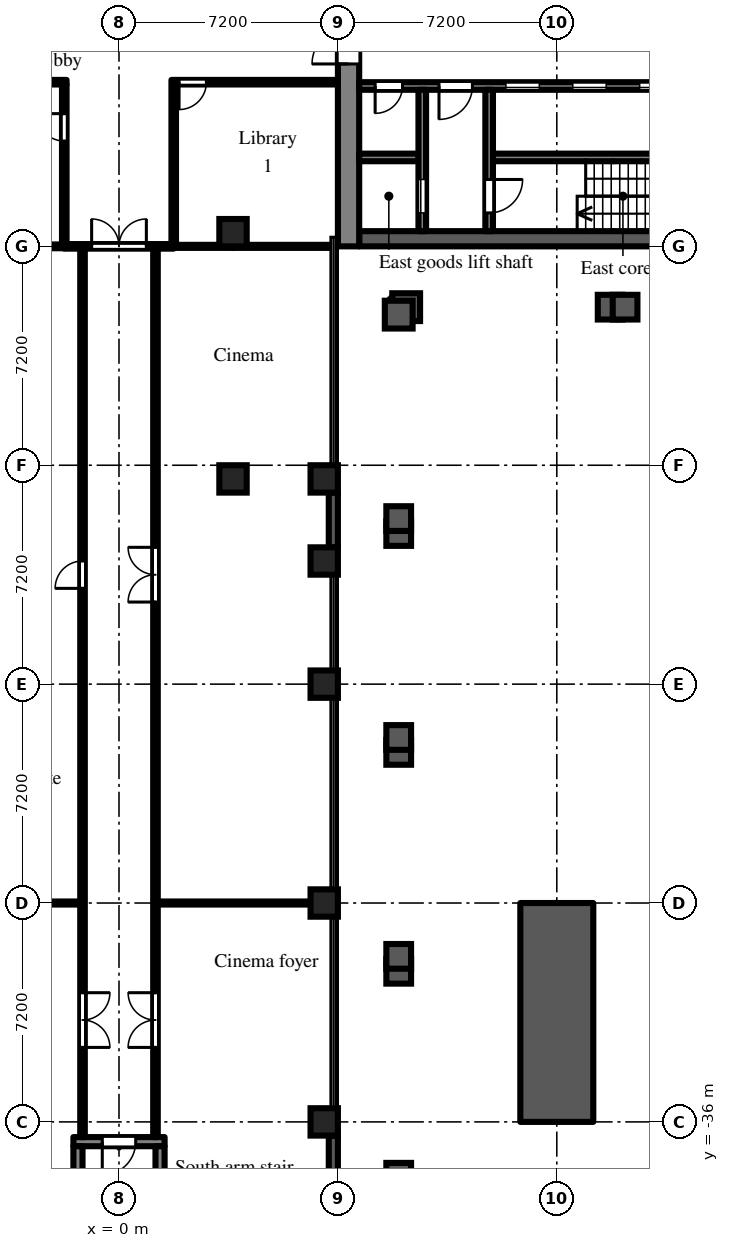
"""IFC4 building model, lengths in metres.
Left out: names, types, materials, properties, quantities, classifications, styles, units other than length and angle.
Written with IfcOpenShell. Run it as: python <this file> out.ifc"""

import sys

from ifc_helpers import new_model, si_unit, direction, frame, frame_2d, origin, origin_2d, place, context, subcontext, project, spatial, rectangle, extrude, element, fill, save


model = new_model("IFC4")
c1 = context("Model", 3, precision=1e-05, world=origin(), true_north=direction((0.0, 1.0)))
c2 = subcontext(c1, "Body", "Model", "MODEL_VIEW")
j1 = project(units=[si_unit("LENGTHUNIT", "METRE"), si_unit("PLANEANGLEUNIT", "RADIAN")], contexts=[c1])
p1 = place(None, origin())
s1 = spatial("IfcSite", under=j1, at=p1, CompositionType="ELEMENT")
p2 = place(p1, origin())
s2 = spatial("IfcBuilding", under=s1, at=p2, CompositionType="ELEMENT")
p3 = place(p2, frame((0.0, 0.0, 7.2)))
s3 = spatial("IfcBuildingStorey", under=s2, at=p3, CompositionType="ELEMENT", Elevation=7.2)
for number, where, z_axis, x_axis in (
    (1, (3.75, -14.85, 0.0), (0.0, 0.0, 1.0), (1.0, 0.0, 0.0)),
    (2, (3.75, -6.75, 0.0), (0.0, 0.0, 1.0), (1.0, 0.0, 0.0)),
    (3, (6.75, -36.0, 0.0), (0.0, 0.0, 1.0), (1.0, 0.0, 0.0)),
    (4, (6.75, -28.8, 0.0), (0.0, 0.0, 1.0), (1.0, 0.0, 0.0)),
    (5, (6.75, -21.6, 0.0), (0.0, 0.0, 1.0), (1.0, 0.0, 0.0)),
    (6, (6.75, -17.55, 0.0), (0.0, 0.0, 1.0), (1.0, 0.0, 0.0)),
    (7, (6.75, -14.85, 0.0), (0.0, 0.0, 1.0), (1.0, 0.0, 0.0)),
):
    element("IfcColumn", number, at=place(p3, frame(where, z_axis=z_axis, x_axis=x_axis)), inside=s3, PredefinedType="COLUMN", context=c2, shape_type="SweptSolid", body=[
        extrude(rectangle(XDim=0.9, YDim=0.9, at=origin_2d()), origin(), (0.0, 0.0, 1.0), 4.5),
    ])
p4 = place(p3, frame((14.4, -36.0, 0.0), z_axis=(0.0, 0.0, 1.0), x_axis=(0.0, 1.0, 0.0)))
e8 = element("IfcWall", 8, at=p4, inside=s3, PredefinedType="SOLIDWALL", context=c2, shape_type="SweptSolid", body=[
    extrude(rectangle(XDim=7.2, YDim=2.4, at=frame_2d((3.6, 0.0))), origin(), (0.0, 0.0, 1.0), 0.8),
])
p5 = place(p3, frame((7.05, -38.7, 0.0), z_axis=(0.0, 0.0, 1.0), x_axis=(0.0, 1.0, 0.0)))
e9 = element("IfcWall", 9, at=p5, inside=s3, PredefinedType="SOLIDWALL", context=c2, shape_type="SweptSolid", body=[
    extrude(rectangle(XDim=2.25, YDim=0.3, at=frame_2d((1.125, 0.0))), origin(), (0.0, 0.0, 1.0), 3.6),
])
p6 = place(p3, frame((7.05, -17.1, 0.0), z_axis=(0.0, 0.0, 1.0), x_axis=(0.0, 1.0, 0.0)))
e10 = element("IfcWall", 10, at=p6, inside=s3, PredefinedType="SOLIDWALL", context=c2, shape_type="SweptSolid", body=[
    extrude(rectangle(XDim=1.8, YDim=0.3, at=frame_2d((0.9, 0.0))), origin(), (0.0, 0.0, 1.0), 3.6),
])
p7 = place(p3, frame((7.55, -7.2, 0.0), z_axis=(0.0, 0.0, 1.0), x_axis=(0.0, 1.0, 0.0)))
e11 = element("IfcWall", 11, at=p7, inside=s3, PredefinedType="SHEAR", context=c2, shape_type="SweptSolid", body=[
    extrude(rectangle(XDim=14.4, YDim=0.7, at=frame_2d((7.2, 0.0))), origin(), (0.0, 0.0, 1.0), 4.075),
])
p8 = place(p7, frame((6.0, 0.0, 0.0)))
e12 = element("IfcOpeningElement", 12, at=p8, cuts=e11, PredefinedType="OPENING", context=c2, shape_type="SweptSolid", body=[
    extrude(rectangle(XDim=2.4, YDim=2.2, at=frame_2d((1.2, 1.1))), frame((0.0, 0.36, 0.0), z_axis=(0.0, -1.0, 0.0), x_axis=(1.0, 0.0, 0.0)), (0.0, 0.0, 1.0), 0.72),
])
p9 = place(p3, frame((7.9, -6.95, 0.0), z_axis=(0.0, 0.0, 1.0), x_axis=(1.0, 0.0, 0.0)))
e13 = element("IfcWall", 13, at=p9, inside=s3, PredefinedType="SHEAR", context=c2, shape_type="SweptSolid", body=[
    extrude(rectangle(XDim=12.95, YDim=0.5, at=frame_2d((6.475, 0.0))), origin(), (0.0, 0.0, 1.0), 4.075),
])
p10 = place(p3, frame((7.9, -1.925, 0.0), z_axis=(0.0, 0.0, 1.0), x_axis=(1.0, 0.0, 0.0)))
e14 = element("IfcWall", 14, at=p10, inside=s3, PredefinedType="SHEAR", context=c2, shape_type="SweptSolid", body=[
    extrude(rectangle(XDim=12.95, YDim=0.25, at=frame_2d((6.475, 0.0))), origin(), (0.0, 0.0, 1.0), 4.075),
])
p11 = place(p10, frame((4.825, 0.0, 0.0)))
e15 = element("IfcOpeningElement", 15, at=p11, cuts=e14, PredefinedType="OPENING", context=c2, shape_type="SweptSolid", body=[
    extrude(rectangle(XDim=1.1, YDim=2.1, at=frame_2d((0.55, 1.05))), frame((0.0, 0.135, 0.0), z_axis=(0.0, -1.0, 0.0), x_axis=(1.0, 0.0, 0.0)), (0.0, 0.0, 1.0), 0.27),
])
p12 = place(p10, frame((7.025, 0.0, 0.0)))
e16 = element("IfcOpeningElement", 16, at=p12, cuts=e14, PredefinedType="OPENING", context=c2, shape_type="SweptSolid", body=[
    extrude(rectangle(XDim=1.1, YDim=2.1, at=frame_2d((0.55, 1.05))), frame((0.0, 0.135, 0.0), z_axis=(0.0, -1.0, 0.0), x_axis=(1.0, 0.0, 0.0)), (0.0, 0.0, 1.0), 0.27),
])
p13 = place(p10, frame((9.225, 0.0, 0.0)))
e17 = element("IfcOpeningElement", 17, at=p13, cuts=e14, PredefinedType="OPENING", context=c2, shape_type="SweptSolid", body=[
    extrude(rectangle(XDim=1.1, YDim=2.1, at=frame_2d((0.55, 1.05))), frame((0.0, 0.135, 0.0), z_axis=(0.0, -1.0, 0.0), x_axis=(1.0, 0.0, 0.0)), (0.0, 0.0, 1.0), 0.27),
])
p14 = place(p10, frame((0.525, 0.0, 0.0)))
e18 = element("IfcOpeningElement", 18, at=p14, cuts=e14, PredefinedType="OPENING", context=c2, shape_type="SweptSolid", body=[
    extrude(rectangle(XDim=0.9, YDim=2.1, at=frame_2d((0.45, 1.05))), frame((0.0, 0.135, 0.0), z_axis=(0.0, -1.0, 0.0), x_axis=(1.0, 0.0, 0.0)), (0.0, 0.0, 1.0), 0.27),
])
p15 = place(p10, frame((2.625, 0.0, 0.0)))
e19 = element("IfcOpeningElement", 19, at=p15, cuts=e14, PredefinedType="OPENING", context=c2, shape_type="SweptSolid", body=[
    extrude(rectangle(XDim=1.1, YDim=2.1, at=frame_2d((0.55, 1.05))), frame((0.0, 0.135, 0.0), z_axis=(0.0, -1.0, 0.0), x_axis=(1.0, 0.0, 0.0)), (0.0, 0.0, 1.0), 0.27),
])
p16 = place(p3, frame((7.9, -4.275, 0.0), z_axis=(0.0, 0.0, 1.0), x_axis=(1.0, 0.0, 0.0)))
e20 = element("IfcWall", 20, at=p16, inside=s3, PredefinedType="SHEAR", context=c2, shape_type="SweptSolid", body=[
    extrude(rectangle(XDim=1.95, YDim=0.25, at=frame_2d((0.975, 0.0))), origin(), (0.0, 0.0, 1.0), 4.075),
])
p17 = place(p3, frame((12.3, -4.275, 0.0), z_axis=(0.0, 0.0, 1.0), x_axis=(1.0, 0.0, 0.0)))
e21 = element("IfcWall", 21, at=p17, inside=s3, PredefinedType="SHEAR", context=c2, shape_type="SweptSolid", body=[
    extrude(rectangle(XDim=8.55, YDim=0.25, at=frame_2d((4.275, 0.0))), origin(), (0.0, 0.0, 1.0), 4.075),
])
p18 = place(p3, frame((9.975, -2.05, 0.0), z_axis=(0.0, 0.0, 1.0), x_axis=(0.0, -1.0, 0.0)))
e22 = element("IfcWall", 22, at=p18, inside=s3, PredefinedType="SHEAR", context=c2, shape_type="SweptSolid", body=[
    extrude(rectangle(XDim=4.65, YDim=0.25, at=frame_2d((2.325, 0.0))), origin(), (0.0, 0.0, 1.0), 4.075),
])
p19 = place(p18, frame((2.95, 0.0, 0.0)))
e23 = element("IfcOpeningElement", 23, at=p19, cuts=e22, PredefinedType="OPENING", context=c2, shape_type="SweptSolid", body=[
    extrude(rectangle(XDim=1.1, YDim=2.1, at=frame_2d((0.55, 1.05))), frame((0.0, 0.135, 0.0), z_axis=(0.0, -1.0, 0.0), x_axis=(1.0, 0.0, 0.0)), (0.0, 0.0, 1.0), 0.27),
])
p20 = place(p3, frame((12.175, -2.05, 0.0), z_axis=(0.0, 0.0, 1.0), x_axis=(0.0, -1.0, 0.0)))
e24 = element("IfcWall", 24, at=p20, inside=s3, PredefinedType="SHEAR", context=c2, shape_type="SweptSolid", body=[
    extrude(rectangle(XDim=4.65, YDim=0.25, at=frame_2d((2.325, 0.0))), origin(), (0.0, 0.0, 1.0), 4.075),
])
p21 = place(p20, frame((2.95, 0.0, 0.0)))
e25 = element("IfcOpeningElement", 25, at=p21, cuts=e24, PredefinedType="OPENING", context=c2, shape_type="SweptSolid", body=[
    extrude(rectangle(XDim=1.1, YDim=2.1, at=frame_2d((0.55, 1.05))), frame((0.0, 0.135, 0.0), z_axis=(0.0, -1.0, 0.0), x_axis=(1.0, 0.0, 0.0)), (0.0, 0.0, 1.0), 0.27),
])
p22 = place(p3, frame((-1.5, -36.65, 0.0), z_axis=(0.0, 0.0, 1.0), x_axis=(1.0, 0.0, 0.0)))
e26 = element("IfcWall", 26, at=p22, inside=s3, PredefinedType="SHEAR", context=c2, shape_type="SweptSolid", body=[
    extrude(rectangle(XDim=3.0, YDim=0.3, at=frame_2d((1.5, 0.0))), origin(), (0.0, 0.0, 1.0), 4.075),
])
p23 = place(p22, frame((0.95, 0.0, 0.0)))
e27 = element("IfcOpeningElement", 27, at=p23, cuts=e26, PredefinedType="OPENING", context=c2, shape_type="SweptSolid", body=[
    extrude(rectangle(XDim=1.1, YDim=2.1, at=frame_2d((0.55, 1.05))), frame((0.0, 0.16, 0.0), z_axis=(0.0, -1.0, 0.0), x_axis=(1.0, 0.0, 0.0)), (0.0, 0.0, 1.0), 0.32),
])
for number, where, z_axis, x_axis in (
    (28, (-1.35, -36.8, 0.0), (0.0, 0.0, 1.0), (0.0, -1.0, 0.0)),
    (29, (1.35, -36.8, 0.0), (0.0, 0.0, 1.0), (0.0, -1.0, 0.0)),
):
    element("IfcWall", number, at=place(p3, frame(where, z_axis=z_axis, x_axis=x_axis)), inside=s3, PredefinedType="SHEAR", context=c2, shape_type="SweptSolid", body=[
        extrude(rectangle(XDim=5.8, YDim=0.3, at=frame_2d((2.9, 0.0))), origin(), (0.0, 0.0, 1.0), 4.075),
    ])
p24 = place(p3, frame((-7.2, -1.8, 0.0), z_axis=(0.0, 0.0, 1.0), x_axis=(1.0, 0.0, 0.0)))
e30 = element("IfcWall", 30, at=p24, inside=s3, PredefinedType="PARTITIONING", context=c2, shape_type="SweptSolid", body=[
    extrude(rectangle(XDim=5.475, YDim=0.15, at=frame_2d((2.737, 0.0))), origin(), (0.0, 0.0, 1.0), 4.075),
])
p25 = place(p24, frame((1.035, 0.0, 0.0)))
e31 = element("IfcOpeningElement", 31, at=p25, cuts=e30, PredefinedType="OPENING", context=c2, shape_type="SweptSolid", body=[
    extrude(rectangle(XDim=0.9, YDim=2.1, at=frame_2d((0.45, 1.05))), frame((0.0, 0.085, 0.0), z_axis=(0.0, -1.0, 0.0), x_axis=(1.0, 0.0, 0.0)), (0.0, 0.0, 1.0), 0.17),
])
p26 = place(p3, frame((-6.9, -28.8, 0.0), z_axis=(0.0, 0.0, 1.0), x_axis=(1.0, 0.0, 0.0)))
e32 = element("IfcWall", 32, at=p26, inside=s3, PredefinedType="PARTITIONING", context=c2, shape_type="SweptSolid", body=[
    extrude(rectangle(XDim=5.625, YDim=0.1, at=frame_2d((2.812, 0.0))), origin(), (0.0, 0.0, 1.0), 4.075),
])
p27 = place(p3, frame((-1.8, -7.125, 0.0), z_axis=(0.0, 0.0, 1.0), x_axis=(0.0, 1.0, 0.0)))
e33 = element("IfcWall", 33, at=p27, inside=s3, PredefinedType="PARTITIONING", context=c2, shape_type="SweptSolid", body=[
    extrude(rectangle(XDim=5.25, YDim=0.15, at=frame_2d((2.625, 0.0))), origin(), (0.0, 0.0, 1.0), 4.075),
])
p28 = place(p27, frame((3.39, 0.0, 0.0)))
e34 = element("IfcOpeningElement", 34, at=p28, cuts=e33, PredefinedType="OPENING", context=c2, shape_type="SweptSolid", body=[
    extrude(rectangle(XDim=0.9, YDim=2.1, at=frame_2d((0.45, 1.05))), frame((0.0, 0.085, 0.0), z_axis=(0.0, -1.0, 0.0), x_axis=(1.0, 0.0, 0.0)), (0.0, 0.0, 1.0), 0.17),
])
p29 = place(p3, frame((-1.8, -7.2, 0.0), z_axis=(0.0, 0.0, 1.0), x_axis=(1.0, 0.0, 0.0)))
e35 = element("IfcWall", 35, at=p29, inside=s3, PredefinedType="PARTITIONING", context=c2, shape_type="SweptSolid", body=[
    extrude(rectangle(XDim=3.6, YDim=0.15, at=frame_2d((1.8, 0.0))), origin(), (0.0, 0.0, 1.0), 4.075),
])
p30 = place(p29, frame((0.9, 0.0, 0.0)))
e36 = element("IfcOpeningElement", 36, at=p30, cuts=e35, PredefinedType="OPENING", context=c2, shape_type="SweptSolid", body=[
    extrude(rectangle(XDim=1.8, YDim=2.1, at=frame_2d((0.9, 1.05))), frame((0.0, 0.085, 0.0), z_axis=(0.0, -1.0, 0.0), x_axis=(1.0, 0.0, 0.0)), (0.0, 0.0, 1.0), 0.17),
])
p31 = place(p3, frame((-1.2, -36.5, 0.0), z_axis=(0.0, 0.0, 1.0), x_axis=(0.0, 1.0, 0.0)))
e37 = element("IfcWall", 37, at=p31, inside=s3, PredefinedType="PARTITIONING", context=c2, shape_type="SweptSolid", body=[
    extrude(rectangle(XDim=29.225, YDim=0.15, at=frame_2d((14.613, 0.0))), origin(), (0.0, 0.0, 1.0), 4.075),
])
p32 = place(p31, frame((18.05, 0.0, 0.0)))
e38 = element("IfcOpeningElement", 38, at=p32, cuts=e37, PredefinedType="OPENING", context=c2, shape_type="SweptSolid", body=[
    extrude(rectangle(XDim=0.9, YDim=2.1, at=frame_2d((0.45, 1.05))), frame((0.0, 0.085, 0.0), z_axis=(0.0, -1.0, 0.0), x_axis=(1.0, 0.0, 0.0)), (0.0, 0.0, 1.0), 0.17),
])
p33 = place(p31, frame((2.95, 0.0, 0.0)))
e39 = element("IfcOpeningElement", 39, at=p33, cuts=e37, PredefinedType="OPENING", context=c2, shape_type="SweptSolid", body=[
    extrude(rectangle(XDim=1.8, YDim=2.1, at=frame_2d((0.9, 1.05))), frame((0.0, 0.085, 0.0), z_axis=(0.0, -1.0, 0.0), x_axis=(1.0, 0.0, 0.0)), (0.0, 0.0, 1.0), 0.17),
])
p34 = place(p3, frame((1.2, -36.5, 0.0), z_axis=(0.0, 0.0, 1.0), x_axis=(0.0, 1.0, 0.0)))
e40 = element("IfcWall", 40, at=p34, inside=s3, PredefinedType="PARTITIONING", context=c2, shape_type="SweptSolid", body=[
    extrude(rectangle(XDim=29.225, YDim=0.15, at=frame_2d((14.613, 0.0))), origin(), (0.0, 0.0, 1.0), 4.075),
])
p35 = place(p34, frame((17.6, 0.0, 0.0)))
e41 = element("IfcOpeningElement", 41, at=p35, cuts=e40, PredefinedType="OPENING", context=c2, shape_type="SweptSolid", body=[
    extrude(rectangle(XDim=1.8, YDim=2.1, at=frame_2d((0.9, 1.05))), frame((0.0, 0.085, 0.0), z_axis=(0.0, -1.0, 0.0), x_axis=(1.0, 0.0, 0.0)), (0.0, 0.0, 1.0), 0.17),
])
p36 = place(p34, frame((2.95, 0.0, 0.0)))
e42 = element("IfcOpeningElement", 42, at=p36, cuts=e40, PredefinedType="OPENING", context=c2, shape_type="SweptSolid", body=[
    extrude(rectangle(XDim=1.8, YDim=2.1, at=frame_2d((0.9, 1.05))), frame((0.0, 0.085, 0.0), z_axis=(0.0, -1.0, 0.0), x_axis=(1.0, 0.0, 0.0)), (0.0, 0.0, 1.0), 0.17),
])
p37 = place(p3, frame((1.275, -28.8, 0.0), z_axis=(0.0, 0.0, 1.0), x_axis=(1.0, 0.0, 0.0)))
e43 = element("IfcWall", 43, at=p37, inside=s3, PredefinedType="PARTITIONING", context=c2, shape_type="SweptSolid", body=[
    extrude(rectangle(XDim=5.625, YDim=0.1, at=frame_2d((2.812, 0.0))), origin(), (0.0, 0.0, 1.0), 4.075),
])
p38 = place(p3, frame((1.8, -7.125, 0.0), z_axis=(0.0, 0.0, 1.0), x_axis=(0.0, 1.0, 0.0)))
e44 = element("IfcWall", 44, at=p38, inside=s3, PredefinedType="PARTITIONING", context=c2, shape_type="SweptSolid", body=[
    extrude(rectangle(XDim=5.4, YDim=0.15, at=frame_2d((2.7, 0.0))), origin(), (0.0, 0.0, 1.0), 4.075),
])
p39 = place(p3, frame((1.8, -7.2, 0.0), z_axis=(0.0, 0.0, 1.0), x_axis=(1.0, 0.0, 0.0)))
e45 = element("IfcWall", 45, at=p39, inside=s3, PredefinedType="PARTITIONING", context=c2, shape_type="SweptSolid", body=[
    extrude(rectangle(XDim=1.95, YDim=0.1, at=frame_2d((0.975, 0.0))), origin(), (0.0, 0.0, 1.0), 4.075),
])
p40 = place(p3, frame((1.875, -1.8, 0.0), z_axis=(0.0, 0.0, 1.0), x_axis=(1.0, 0.0, 0.0)))
e46 = element("IfcWall", 46, at=p40, inside=s3, PredefinedType="PARTITIONING", context=c2, shape_type="SweptSolid", body=[
    extrude(rectangle(XDim=5.325, YDim=0.15, at=frame_2d((2.663, 0.0))), origin(), (0.0, 0.0, 1.0), 4.075),
])
p41 = place(p40, frame((0.1, 0.0, 0.0)))
e47 = element("IfcOpeningElement", 47, at=p41, cuts=e46, PredefinedType="OPENING", context=c2, shape_type="SweptSolid", body=[
    extrude(rectangle(XDim=0.9, YDim=2.1, at=frame_2d((0.45, 1.05))), frame((0.0, 0.085, 0.0), z_axis=(0.0, -1.0, 0.0), x_axis=(1.0, 0.0, 0.0)), (0.0, 0.0, 1.0), 0.17),
])
p42 = place(p3, frame((-3.75, -7.2, 0.0), z_axis=(0.0, 0.0, 1.0), x_axis=(1.0, 0.0, 0.0)))
e48 = element("IfcWall", 48, at=p42, inside=s3, PredefinedType="PARTITIONING", context=c2, shape_type="SweptSolid", body=[
    extrude(rectangle(XDim=1.95, YDim=0.125, at=frame_2d((0.975, 0.0))), origin(), (0.0, 0.0, 1.0), 4.075),
])
p43 = place(p3, frame((3.75, -7.2, 0.0), z_axis=(0.0, 0.0, 1.0), x_axis=(1.0, 0.0, 0.0)))
e49 = element("IfcWall", 49, at=p43, inside=s3, PredefinedType="PARTITIONING", context=c2, shape_type="SweptSolid", body=[
    extrude(rectangle(XDim=3.27, YDim=0.1, at=frame_2d((1.635, 0.0))), origin(), (0.0, 0.0, 1.0), 3.6),
])
p44 = place(p11, origin())
e50 = element("IfcDoor", 50, at=p44, inside=s3, OperationType="SLIDING_TO_LEFT", PredefinedType="DOOR", context=c2, shape_type="SweptSolid", body=[
    extrude(rectangle(XDim=1.1, YDim=2.1, at=frame_2d((0.55, 1.05))), frame((0.0, 0.025, 0.0), z_axis=(0.0, -1.0, 0.0), x_axis=(1.0, 0.0, 0.0)), (0.0, 0.0, 1.0), 0.05),
])
fill(e15, e50)
p45 = place(p12, origin())
e51 = element("IfcDoor", 51, at=p45, inside=s3, OperationType="SLIDING_TO_LEFT", PredefinedType="DOOR", context=c2, shape_type="SweptSolid", body=[
    extrude(rectangle(XDim=1.1, YDim=2.1, at=frame_2d((0.55, 1.05))), frame((0.0, 0.025, 0.0), z_axis=(0.0, -1.0, 0.0), x_axis=(1.0, 0.0, 0.0)), (0.0, 0.0, 1.0), 0.05),
])
fill(e16, e51)
p46 = place(p13, origin())
e52 = element("IfcDoor", 52, at=p46, inside=s3, OperationType="SLIDING_TO_LEFT", PredefinedType="DOOR", context=c2, shape_type="SweptSolid", body=[
    extrude(rectangle(XDim=1.1, YDim=2.1, at=frame_2d((0.55, 1.05))), frame((0.0, 0.025, 0.0), z_axis=(0.0, -1.0, 0.0), x_axis=(1.0, 0.0, 0.0)), (0.0, 0.0, 1.0), 0.05),
])
fill(e17, e52)
p47 = place(p19, origin())
e53 = element("IfcDoor", 53, at=p47, inside=s3, OperationType="SLIDING_TO_LEFT", PredefinedType="DOOR", context=c2, shape_type="SweptSolid", body=[
    extrude(rectangle(XDim=1.1, YDim=2.1, at=frame_2d((0.55, 1.05))), frame((0.0, 0.025, 0.0), z_axis=(0.0, -1.0, 0.0), x_axis=(1.0, 0.0, 0.0)), (0.0, 0.0, 1.0), 0.05),
])
fill(e23, e53)
p48 = place(p21, origin())
e54 = element("IfcDoor", 54, at=p48, inside=s3, OperationType="SINGLE_SWING_LEFT", PredefinedType="DOOR", context=c2, shape_type="SweptSolid", body=[
    extrude(rectangle(XDim=1.1, YDim=2.1, at=frame_2d((0.55, 1.05))), frame((0.0, 0.025, 0.0), z_axis=(0.0, -1.0, 0.0), x_axis=(1.0, 0.0, 0.0)), (0.0, 0.0, 1.0), 0.05),
])
fill(e25, e54)
p49 = place(p14, frame((0.9, 0.0, 0.0), z_axis=(0.0, 0.0, 1.0), x_axis=(-1.0, 0.0, 0.0)))
e55 = element("IfcDoor", 55, at=p49, inside=s3, OperationType="SINGLE_SWING_RIGHT", PredefinedType="DOOR", context=c2, shape_type="SweptSolid", body=[
    extrude(rectangle(XDim=0.9, YDim=2.1, at=frame_2d((0.45, 1.05))), frame((0.0, 0.025, 0.0), z_axis=(0.0, -1.0, 0.0), x_axis=(1.0, 0.0, 0.0)), (0.0, 0.0, 1.0), 0.05),
])
fill(e18, e55)
p50 = place(p15, frame((1.1, 0.0, 0.0), z_axis=(0.0, 0.0, 1.0), x_axis=(-1.0, 0.0, 0.0)))
e56 = element("IfcDoor", 56, at=p50, inside=s3, OperationType="SINGLE_SWING_RIGHT", PredefinedType="DOOR", context=c2, shape_type="SweptSolid", body=[
    extrude(rectangle(XDim=1.1, YDim=2.1, at=frame_2d((0.55, 1.05))), frame((0.0, 0.025, 0.0), z_axis=(0.0, -1.0, 0.0), x_axis=(1.0, 0.0, 0.0)), (0.0, 0.0, 1.0), 0.05),
])
fill(e19, e56)
p51 = place(p8, origin())
e57 = element("IfcDoor", 57, at=p51, inside=s3, OperationType="DOUBLE_DOOR_DOUBLE_SWING", PredefinedType="DOOR", context=c2, shape_type="SweptSolid", body=[
    extrude(rectangle(XDim=2.4, YDim=2.2, at=frame_2d((1.2, 1.1))), frame((0.0, 0.025, 0.0), z_axis=(0.0, -1.0, 0.0), x_axis=(1.0, 0.0, 0.0)), (0.0, 0.0, 1.0), 0.05),
])
fill(e12, e57)
p52 = place(p23, frame((1.1, 0.0, 0.0), z_axis=(0.0, 0.0, 1.0), x_axis=(-1.0, 0.0, 0.0)))
e58 = element("IfcDoor", 58, at=p52, inside=s3, OperationType="SINGLE_SWING_RIGHT", PredefinedType="DOOR", context=c2, shape_type="SweptSolid", body=[
    extrude(rectangle(XDim=1.1, YDim=2.1, at=frame_2d((0.55, 1.05))), frame((0.0, 0.025, 0.0), z_axis=(0.0, -1.0, 0.0), x_axis=(1.0, 0.0, 0.0)), (0.0, 0.0, 1.0), 0.05),
])
fill(e27, e58)
p53 = place(p28, origin())
e59 = element("IfcDoor", 59, at=p53, inside=s3, OperationType="SINGLE_SWING_RIGHT", PredefinedType="DOOR", context=c2, shape_type="SweptSolid", body=[
    extrude(rectangle(XDim=0.9, YDim=2.1, at=frame_2d((0.45, 1.05))), frame((0.0, 0.025, 0.0), z_axis=(0.0, -1.0, 0.0), x_axis=(1.0, 0.0, 0.0)), (0.0, 0.0, 1.0), 0.05),
])
fill(e34, e59)
p54 = place(p41, frame((0.9, 0.0, 0.0), z_axis=(0.0, 0.0, 1.0), x_axis=(-1.0, 0.0, 0.0)))
e60 = element("IfcDoor", 60, at=p54, inside=s3, OperationType="SINGLE_SWING_RIGHT", PredefinedType="DOOR", context=c2, shape_type="SweptSolid", body=[
    extrude(rectangle(XDim=0.9, YDim=2.1, at=frame_2d((0.45, 1.05))), frame((0.0, 0.025, 0.0), z_axis=(0.0, -1.0, 0.0), x_axis=(1.0, 0.0, 0.0)), (0.0, 0.0, 1.0), 0.05),
])
fill(e47, e60)
p55 = place(p30, origin())
e61 = element("IfcDoor", 61, at=p55, inside=s3, OperationType="DOUBLE_DOOR_DOUBLE_SWING", PredefinedType="DOOR", context=c2, shape_type="SweptSolid", body=[
    extrude(rectangle(XDim=1.8, YDim=2.1, at=frame_2d((0.9, 1.05))), frame((0.0, 0.025, 0.0), z_axis=(0.0, -1.0, 0.0), x_axis=(1.0, 0.0, 0.0)), (0.0, 0.0, 1.0), 0.05),
])
fill(e36, e61)
p56 = place(p35, origin())
e62 = element("IfcDoor", 62, at=p56, inside=s3, OperationType="DOUBLE_DOOR_DOUBLE_SWING", PredefinedType="DOOR", context=c2, shape_type="SweptSolid", body=[
    extrude(rectangle(XDim=1.8, YDim=2.1, at=frame_2d((0.9, 1.05))), frame((0.0, 0.025, 0.0), z_axis=(0.0, -1.0, 0.0), x_axis=(1.0, 0.0, 0.0)), (0.0, 0.0, 1.0), 0.05),
])
fill(e41, e62)
p57 = place(p36, origin())
e63 = element("IfcDoor", 63, at=p57, inside=s3, OperationType="DOUBLE_DOOR_DOUBLE_SWING", PredefinedType="DOOR", context=c2, shape_type="SweptSolid", body=[
    extrude(rectangle(XDim=1.8, YDim=2.1, at=frame_2d((0.9, 1.05))), frame((0.0, 0.025, 0.0), z_axis=(0.0, -1.0, 0.0), x_axis=(1.0, 0.0, 0.0)), (0.0, 0.0, 1.0), 0.05),
])
fill(e42, e63)
p58 = place(p32, origin())
e64 = element("IfcDoor", 64, at=p58, inside=s3, OperationType="SINGLE_SWING_LEFT", PredefinedType="DOOR", context=c2, shape_type="SweptSolid", body=[
    extrude(rectangle(XDim=0.9, YDim=2.1, at=frame_2d((0.45, 1.05))), frame((0.0, 0.025, 0.0), z_axis=(0.0, -1.0, 0.0), x_axis=(1.0, 0.0, 0.0)), (0.0, 0.0, 1.0), 0.05),
])
fill(e38, e64)
p59 = place(p33, frame((1.8, 0.0, 0.0), z_axis=(0.0, 0.0, 1.0), x_axis=(-1.0, 0.0, 0.0)))
e65 = element("IfcDoor", 65, at=p59, inside=s3, OperationType="DOUBLE_DOOR_DOUBLE_SWING", PredefinedType="DOOR", context=c2, shape_type="SweptSolid", body=[
    extrude(rectangle(XDim=1.8, YDim=2.1, at=frame_2d((0.9, 1.05))), frame((0.0, 0.025, 0.0), z_axis=(0.0, -1.0, 0.0), x_axis=(1.0, 0.0, 0.0)), (0.0, 0.0, 1.0), 0.05),
])
fill(e39, e65)
save(model, sys.argv[1])
